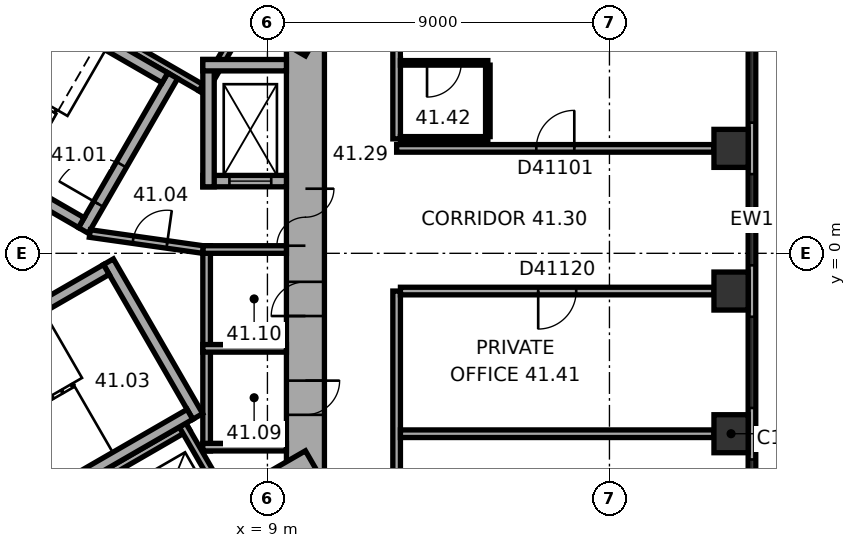
"""IFC4 building model, lengths in metres.
Left out: names, types, materials, properties, quantities, classifications, styles, units other than length and angle.
Written with IfcOpenShell. Run it as: python <this file> out.ifc"""

import sys

from ifc_helpers import new_model, si_unit, direction, frame, frame_2d, origin, origin_2d, place, context, subcontext, project, spatial, rectangle, extrude, element, fill, save


model = new_model("IFC4")
c1 = context("Model", 3, precision=1e-05, world=origin(), true_north=direction((0.0, 1.0)))
c2 = subcontext(c1, "Body", "Model", "MODEL_VIEW")
j1 = project(units=[si_unit("LENGTHUNIT", "METRE"), si_unit("PLANEANGLEUNIT", "RADIAN")], contexts=[c1])
p1 = place(None, origin())
s1 = spatial("IfcSite", under=j1, at=p1, CompositionType="ELEMENT")
p2 = place(p1, origin())
s2 = spatial("IfcBuilding", under=s1, at=p2, CompositionType="ELEMENT")
p3 = place(p2, frame((0.0, 0.0, 168.8)))
s3 = spatial("IfcBuildingStorey", under=s2, at=p3, CompositionType="ELEMENT", Elevation=168.8)
for number, where, z_axis, x_axis in (
    (1, (21.2, -4.747, 0.0), (0.0, 0.0, 1.0), (0.0, 1.0, 0.0)),
    (2, (21.2, -0.993, 0.0), (0.0, 0.0, 1.0), (0.0, 1.0, 0.0)),
    (3, (21.2, 2.761, 0.0), (0.0, 0.0, 1.0), (0.0, 1.0, 0.0)),
):
    element("IfcColumn", number, at=place(p3, frame(where, z_axis=z_axis, x_axis=x_axis)), inside=s3, PredefinedType="COLUMN", context=c2, shape_type="SweptSolid", body=[
        extrude(rectangle(XDim=1.0, YDim=0.9, at=origin_2d()), origin(), (0.0, 0.0, 1.0), 3.7),
    ])
p4 = place(p3, frame((10.0, -6.062, 0.0), z_axis=(0.0, 0.0, 1.0), x_axis=(0.0, 1.0, 0.0)))
e4 = element("IfcWall", 4, at=p4, inside=s3, PredefinedType="SHEAR", context=c2, shape_type="SweptSolid", body=[
    extrude(rectangle(XDim=12.125, YDim=1.0, at=frame_2d((6.062, 0.0))), origin(), (0.0, 0.0, 1.0), 3.7),
])
p5 = place(p4, frame((6.262, 0.0, 0.0)))
e5 = element("IfcOpeningElement", 5, at=p5, cuts=e4, PredefinedType="OPENING", context=c2, shape_type="SweptSolid", body=[
    extrude(rectangle(XDim=1.5, YDim=2.1, at=frame_2d((0.75, 1.05))), frame((0.0, 0.51, 0.0), z_axis=(0.0, -1.0, 0.0), x_axis=(1.0, 0.0, 0.0)), (0.0, 0.0, 1.0), 1.02),
])
p6 = place(p4, frame((1.812, 0.0, 0.0)))
e6 = element("IfcOpeningElement", 6, at=p6, cuts=e4, PredefinedType="OPENING", context=c2, shape_type="SweptSolid", body=[
    extrude(rectangle(XDim=0.9, YDim=2.1, at=frame_2d((0.45, 1.05))), frame((0.0, 0.51, 0.0), z_axis=(0.0, -1.0, 0.0), x_axis=(1.0, 0.0, 0.0)), (0.0, 0.0, 1.0), 1.02),
])
p7 = place(p4, frame((4.412, 0.0, 0.0)))
e7 = element("IfcOpeningElement", 7, at=p7, cuts=e4, PredefinedType="OPENING", context=c2, shape_type="SweptSolid", body=[
    extrude(rectangle(XDim=0.9, YDim=2.1, at=frame_2d((0.45, 1.05))), frame((0.0, 0.51, 0.0), z_axis=(0.0, -1.0, 0.0), x_axis=(1.0, 0.0, 0.0)), (0.0, 0.0, 1.0), 1.02),
])
p8 = place(p3, frame((10.25, 5.629, 0.0), z_axis=(0.0, 0.0, 1.0), x_axis=(-0.866022616891, 0.50000482701, 0.0)))
e8 = element("IfcWall", 8, at=p8, inside=s3, PredefinedType="SHEAR", context=c2, shape_type="SweptSolid", body=[
    extrude(rectangle(XDim=12.125, YDim=1.0, at=frame_2d((6.062, 0.0))), origin(), (0.0, 0.0, 1.0), 3.7),
])
p9 = place(p8, frame((4.012, 0.0, 0.0)))
e9 = element("IfcOpeningElement", 9, at=p9, cuts=e8, PredefinedType="OPENING", context=c2, shape_type="SweptSolid", body=[
    extrude(rectangle(XDim=0.9, YDim=2.1, at=frame_2d((0.45, 1.05))), frame((0.0, 0.51, 0.0), z_axis=(0.0, -1.0, 0.0), x_axis=(1.0, 0.0, 0.0)), (0.0, 0.0, 1.0), 1.02),
])
p10 = place(p8, frame((7.912, 0.0, 0.0)))
e10 = element("IfcOpeningElement", 10, at=p10, cuts=e8, PredefinedType="OPENING", context=c2, shape_type="SweptSolid", body=[
    extrude(rectangle(XDim=0.9, YDim=2.1, at=frame_2d((0.45, 1.05))), frame((0.0, 0.51, 0.0), z_axis=(0.0, -1.0, 0.0), x_axis=(1.0, 0.0, 0.0)), (0.0, 0.0, 1.0), 1.02),
])
p11 = place(p3, frame((-0.25, -11.691, 0.0), z_axis=(0.0, 0.0, 1.0), x_axis=(0.866022616891, 0.50000482701, 0.0)))
e11 = element("IfcWall", 11, at=p11, inside=s3, PredefinedType="SHEAR", context=c2, shape_type="SweptSolid", body=[
    extrude(rectangle(XDim=12.125, YDim=1.0, at=frame_2d((6.062, 0.0))), origin(), (0.0, 0.0, 1.0), 3.7),
])
p12 = place(p11, frame((2.612, 0.0, 0.0)))
e12 = element("IfcOpeningElement", 12, at=p12, cuts=e11, PredefinedType="OPENING", context=c2, shape_type="SweptSolid", body=[
    extrude(rectangle(XDim=1.1, YDim=2.1, at=frame_2d((0.55, 1.05))), frame((0.0, 0.51, 0.0), z_axis=(0.0, -1.0, 0.0), x_axis=(1.0, 0.0, 0.0)), (0.0, 0.0, 1.0), 1.02),
])
p13 = place(p11, frame((5.212, 0.0, 0.0)))
e13 = element("IfcOpeningElement", 13, at=p13, cuts=e11, PredefinedType="OPENING", context=c2, shape_type="SweptSolid", body=[
    extrude(rectangle(XDim=1.1, YDim=2.1, at=frame_2d((0.55, 1.05))), frame((0.0, 0.51, 0.0), z_axis=(0.0, -1.0, 0.0), x_axis=(1.0, 0.0, 0.0)), (0.0, 0.0, 1.0), 1.02),
])
p14 = place(p11, frame((7.812, 0.0, 0.0)))
e14 = element("IfcOpeningElement", 14, at=p14, cuts=e11, PredefinedType="OPENING", context=c2, shape_type="SweptSolid", body=[
    extrude(rectangle(XDim=1.1, YDim=2.1, at=frame_2d((0.55, 1.05))), frame((0.0, 0.51, 0.0), z_axis=(0.0, -1.0, 0.0), x_axis=(1.0, 0.0, 0.0)), (0.0, 0.0, 1.0), 1.02),
])
p15 = place(p3, frame((21.75, -9.138, 0.0), z_axis=(0.0, 0.0, 1.0), x_axis=(0.0, 1.0, 0.0)))
e15 = element("IfcWall", 15, at=p15, inside=s3, PredefinedType="STANDARD", context=c2, shape_type="SweptSolid", body=[
    extrude(rectangle(XDim=20.044, YDim=0.2, at=frame_2d((10.022, 0.0))), origin(), (0.0, 0.0, 1.0), 3.7),
])
p16 = place(p15, frame((1.314, 0.0, 0.9)))
e16 = element("IfcOpeningElement", 16, at=p16, cuts=e15, PredefinedType="OPENING", context=c2, shape_type="SweptSolid", body=[
    extrude(rectangle(XDim=2.4, YDim=2.0, at=frame_2d((1.2, 1.0))), frame((0.0, 0.11, 0.0), z_axis=(0.0, -1.0, 0.0), x_axis=(1.0, 0.0, 0.0)), (0.0, 0.0, 1.0), 0.22),
])
p17 = place(p15, frame((5.069, 0.0, 0.9)))
e17 = element("IfcOpeningElement", 17, at=p17, cuts=e15, PredefinedType="OPENING", context=c2, shape_type="SweptSolid", body=[
    extrude(rectangle(XDim=2.4, YDim=2.0, at=frame_2d((1.2, 1.0))), frame((0.0, 0.11, 0.0), z_axis=(0.0, -1.0, 0.0), x_axis=(1.0, 0.0, 0.0)), (0.0, 0.0, 1.0), 0.22),
])
p18 = place(p15, frame((8.823, 0.0, 0.9)))
e18 = element("IfcOpeningElement", 18, at=p18, cuts=e15, PredefinedType="OPENING", context=c2, shape_type="SweptSolid", body=[
    extrude(rectangle(XDim=2.4, YDim=2.0, at=frame_2d((1.2, 1.0))), frame((0.0, 0.11, 0.0), z_axis=(0.0, -1.0, 0.0), x_axis=(1.0, 0.0, 0.0)), (0.0, 0.0, 1.0), 0.22),
])
p19 = place(p15, frame((12.577, 0.0, 0.9)))
e19 = element("IfcOpeningElement", 19, at=p19, cuts=e15, PredefinedType="OPENING", context=c2, shape_type="SweptSolid", body=[
    extrude(rectangle(XDim=2.4, YDim=2.0, at=frame_2d((1.2, 1.0))), frame((0.0, 0.11, 0.0), z_axis=(0.0, -1.0, 0.0), x_axis=(1.0, 0.0, 0.0)), (0.0, 0.0, 1.0), 0.22),
])
p20 = place(p15, frame((16.331, 0.0, 0.9)))
e20 = element("IfcOpeningElement", 20, at=p20, cuts=e15, PredefinedType="OPENING", context=c2, shape_type="SweptSolid", body=[
    extrude(rectangle(XDim=2.4, YDim=2.0, at=frame_2d((1.2, 1.0))), frame((0.0, 0.11, 0.0), z_axis=(0.0, -1.0, 0.0), x_axis=(1.0, 0.0, 0.0)), (0.0, 0.0, 1.0), 0.22),
])
p21 = place(p3, frame((7.4, -5.2, 0.0), z_axis=(0.0, 0.0, 1.0), x_axis=(0.0, 1.0, 0.0)))
e21 = element("IfcWall", 21, at=p21, inside=s3, PredefinedType="PARTITIONING", context=c2, shape_type="SweptSolid", body=[
    extrude(rectangle(XDim=5.4, YDim=0.2, at=frame_2d((2.7, 0.0))), origin(), (0.0, 0.0, 1.0), 3.42),
])
for number, where, z_axis, x_axis in (
    (22, (7.3, -5.1, 0.0), (0.0, 0.0, 1.0), (1.0, 0.0, 0.0)),
    (23, (7.3, -2.5, 0.0), (0.0, 0.0, 1.0), (1.0, 0.0, 0.0)),
    (24, (7.3, 0.1, 0.0), (0.0, 0.0, 1.0), (1.0, 0.0, 0.0)),
):
    element("IfcWall", number, at=place(p3, frame(where, z_axis=z_axis, x_axis=x_axis)), inside=s3, PredefinedType="PARTITIONING", context=c2, shape_type="SweptSolid", body=[
        extrude(rectangle(XDim=2.2, YDim=0.2, at=frame_2d((1.1, 0.0))), origin(), (0.0, 0.0, 1.0), 3.42),
    ])
p22 = place(p3, frame((7.424, 4.259, 0.0), z_axis=(0.0, 0.0, 1.0), x_axis=(-0.866026010844, 0.49999894854, 0.0)))
e25 = element("IfcWall", 25, at=p22, inside=s3, PredefinedType="PARTITIONING", context=c2, shape_type="SweptSolid", body=[
    extrude(rectangle(XDim=8.0, YDim=0.2, at=frame_2d((4.0, 0.0))), origin(), (0.0, 0.0, 1.0), 3.42),
])
p23 = place(p3, frame((7.287, 4.222, 0.0), z_axis=(0.0, 0.0, 1.0), x_axis=(0.499946605688, 0.86605622881, 0.0)))
e26 = element("IfcWall", 26, at=p23, inside=s3, PredefinedType="PARTITIONING", context=c2, shape_type="SweptSolid", body=[
    extrude(rectangle(XDim=2.2, YDim=0.2, at=frame_2d((1.1, 0.0))), origin(), (0.0, 0.0, 1.0), 3.42),
])
p24 = place(p3, frame((-0.024, -8.559, 0.0), z_axis=(0.0, 0.0, 1.0), x_axis=(0.866026010844, 0.49999894854, 0.0)))
e27 = element("IfcWall", 27, at=p24, inside=s3, PredefinedType="PARTITIONING", context=c2, shape_type="SweptSolid", body=[
    extrude(rectangle(XDim=8.0, YDim=0.2, at=frame_2d((4.0, 0.0))), origin(), (0.0, 0.0, 1.0), 3.42),
])
p25 = place(p3, frame((6.768, -4.522, 0.0), z_axis=(0.0, 0.0, 1.0), x_axis=(0.50002983664, -0.866008176907, 0.0)))
e28 = element("IfcWall", 28, at=p25, inside=s3, PredefinedType="PARTITIONING", context=c2, shape_type="SweptSolid", body=[
    extrude(rectangle(XDim=2.2, YDim=0.2, at=frame_2d((1.1, 0.0))), origin(), (0.0, 0.0, 1.0), 3.42),
])
p26 = place(p3, frame((4.158, 0.602, 0.0), z_axis=(0.0, 0.0, 1.0), x_axis=(0.499977259774, 0.866038532462, 0.0)))
e29 = element("IfcWall", 29, at=p26, inside=s3, PredefinedType="SHEAR", context=c2, shape_type="SweptSolid", body=[
    extrude(rectangle(XDim=4.7, YDim=0.3, at=frame_2d((2.35, 0.0))), origin(), (0.0, 0.0, 1.0), 3.42),
])
p27 = place(p26, frame((0.8, 0.0, 0.0)))
e30 = element("IfcOpeningElement", 30, at=p27, cuts=e29, PredefinedType="OPENING", context=c2, shape_type="SweptSolid", body=[
    extrude(rectangle(XDim=1.2, YDim=2.1, at=frame_2d((0.6, 1.05))), frame((0.0, 0.16, 0.0), z_axis=(0.0, -1.0, 0.0), x_axis=(1.0, 0.0, 0.0)), (0.0, 0.0, 1.0), 0.32),
])
for number, where, z_axis, x_axis in (
    (31, (4.103, 0.807, 0.0), (0.0, 0.0, 1.0), (-0.866, 0.5, 0.0)),
    (32, (6.303, 4.617, 0.0), (0.0, 0.0, 1.0), (-0.866, 0.5, 0.0)),
):
    element("IfcWall", number, at=place(p3, frame(where, z_axis=z_axis, x_axis=x_axis)), inside=s3, PredefinedType="SHEAR", context=c2, shape_type="SweptSolid", body=[
        extrude(rectangle(XDim=7.06, YDim=0.3, at=frame_2d((3.53, 0.0))), origin(), (0.0, 0.0, 1.0), 3.42),
    ])
p28 = place(p3, frame((4.816, -0.222, 0.0), z_axis=(0.0, 0.0, 1.0), x_axis=(0.499977259774, -0.866038532462, 0.0)))
e33 = element("IfcWall", 33, at=p28, inside=s3, PredefinedType="SHEAR", context=c2, shape_type="SweptSolid", body=[
    extrude(rectangle(XDim=4.7, YDim=0.3, at=frame_2d((2.35, 0.0))), origin(), (0.0, 0.0, 1.0), 3.42),
])
for number, where, z_axis, x_axis in (
    (34, (-1.353, -3.957, 0.0), (0.0, 0.0, 1.0), (0.866, 0.5, 0.0)),
    (35, (0.847, -7.767, 0.0), (0.0, 0.0, 1.0), (0.866, 0.5, 0.0)),
):
    element("IfcWall", number, at=place(p3, frame(where, z_axis=z_axis, x_axis=x_axis)), inside=s3, PredefinedType="SHEAR", context=c2, shape_type="SweptSolid", body=[
        extrude(rectangle(XDim=7.06, YDim=0.3, at=frame_2d((3.53, 0.0))), origin(), (0.0, 0.0, 1.0), 3.42),
    ])
p29 = place(p3, frame((7.3, 1.9, 0.0), z_axis=(0.0, 0.0, 1.0), x_axis=(1.0, 0.0, 0.0)))
e36 = element("IfcWall", 36, at=p29, inside=s3, PredefinedType="SHEAR", context=c2, shape_type="SweptSolid", body=[
    extrude(rectangle(XDim=2.2, YDim=0.3, at=frame_2d((1.1, 0.0))), origin(), (0.0, 0.0, 1.0), 3.42),
])
p30 = place(p29, frame((0.7, 0.0, 0.0)))
e37 = element("IfcOpeningElement", 37, at=p30, cuts=e36, PredefinedType="OPENING", context=c2, shape_type="SweptSolid", body=[
    extrude(rectangle(XDim=1.1, YDim=2.1, at=frame_2d((0.55, 1.05))), frame((0.0, 0.16, 0.0), z_axis=(0.0, -1.0, 0.0), x_axis=(1.0, 0.0, 0.0)), (0.0, 0.0, 1.0), 0.32),
])
p31 = place(p3, frame((7.45, 1.75, 0.0), z_axis=(0.0, 0.0, 1.0), x_axis=(0.0, 1.0, 0.0)))
e38 = element("IfcWall", 38, at=p31, inside=s3, PredefinedType="SHEAR", context=c2, shape_type="SweptSolid", body=[
    extrude(rectangle(XDim=3.35, YDim=0.3, at=frame_2d((1.675, 0.0))), origin(), (0.0, 0.0, 1.0), 3.42),
])
p32 = place(p3, frame((7.3, 4.95, 0.0), z_axis=(0.0, 0.0, 1.0), x_axis=(1.0, 0.0, 0.0)))
e39 = element("IfcWall", 39, at=p32, inside=s3, PredefinedType="SHEAR", context=c2, shape_type="SweptSolid", body=[
    extrude(rectangle(XDim=2.2, YDim=0.3, at=frame_2d((1.1, 0.0))), origin(), (0.0, 0.0, 1.0), 3.42),
])
p33 = place(p3, frame((4.327, 0.521, 0.0), z_axis=(0.0, 0.0, 1.0), x_axis=(0.990124376366, -0.14019172346, 0.0)))
e40 = element("IfcWall", 40, at=p33, inside=s3, PredefinedType="PARTITIONING", context=c2, shape_type="SweptSolid", body=[
    extrude(rectangle(XDim=3.002, YDim=0.2, at=frame_2d((1.501, 0.0))), origin(), (0.0, 0.0, 1.0), 3.42),
])
p34 = place(p33, frame((1.15, 0.0, 0.0)))
e41 = element("IfcOpeningElement", 41, at=p34, cuts=e40, PredefinedType="OPENING", context=c2, shape_type="SweptSolid", body=[
    extrude(rectangle(XDim=0.9, YDim=2.1, at=frame_2d((0.45, 1.05))), frame((0.0, 0.11, 0.0), z_axis=(0.0, -1.0, 0.0), x_axis=(1.0, 0.0, 0.0)), (0.0, 0.0, 1.0), 0.22),
])
p35 = place(p3, frame((12.4, -6.022, 0.0), z_axis=(0.0, 0.0, 1.0), x_axis=(0.0, 1.0, 0.0)))
e42 = element("IfcWall", 42, at=p35, inside=s3, PredefinedType="PARTITIONING", context=c2, shape_type="SweptSolid", body=[
    extrude(rectangle(XDim=5.029, YDim=0.2, at=frame_2d((2.515, 0.0))), origin(), (0.0, 0.0, 1.0), 3.42),
])
p36 = place(p3, frame((12.4, 3.011, 0.0), z_axis=(0.0, 0.0, 1.0), x_axis=(0.0, 1.0, 0.0)))
e43 = element("IfcWall", 43, at=p36, inside=s3, PredefinedType="PARTITIONING", context=c2, shape_type="SweptSolid", body=[
    extrude(rectangle(XDim=3.051, YDim=0.2, at=frame_2d((1.525, 0.0))), origin(), (0.0, 0.0, 1.0), 3.42),
])
p37 = place(p3, frame((12.5, -0.993, 0.0), z_axis=(0.0, 0.0, 1.0), x_axis=(1.0, 0.0, 0.0)))
e44 = element("IfcWall", 44, at=p37, inside=s3, PredefinedType="PARTITIONING", context=c2, shape_type="SweptSolid", body=[
    extrude(rectangle(XDim=8.25, YDim=0.2, at=frame_2d((4.125, 0.0))), origin(), (0.0, 0.0, 1.0), 2.87),
])
p38 = place(p37, frame((3.625, 0.0, 0.0)))
e45 = element("IfcOpeningElement", 45, at=p38, cuts=e44, PredefinedType="OPENING", context=c2, shape_type="SweptSolid", body=[
    extrude(rectangle(XDim=1.0, YDim=2.1, at=frame_2d((0.5, 1.05))), frame((0.0, 0.11, 0.0), z_axis=(0.0, -1.0, 0.0), x_axis=(1.0, 0.0, 0.0)), (0.0, 0.0, 1.0), 0.22),
])
p39 = place(p3, frame((12.5, 5.011, 0.0), z_axis=(0.0, 0.0, 1.0), x_axis=(1.0, 0.0, 0.0)))
e46 = element("IfcWall", 46, at=p39, inside=s3, PredefinedType="PARTITIONING", context=c2, shape_type="SweptSolid", body=[
    extrude(rectangle(XDim=2.3, YDim=0.12, at=frame_2d((1.15, 0.0))), origin(), (0.0, 0.0, 1.0), 3.42),
])
p40 = place(p39, frame((0.7, 0.0, 0.0)))
e47 = element("IfcOpeningElement", 47, at=p40, cuts=e46, PredefinedType="OPENING", context=c2, shape_type="SweptSolid", body=[
    extrude(rectangle(XDim=0.9, YDim=2.1, at=frame_2d((0.45, 1.05))), frame((0.0, 0.07, 0.0), z_axis=(0.0, -1.0, 0.0), x_axis=(1.0, 0.0, 0.0)), (0.0, 0.0, 1.0), 0.14),
])
p41 = place(p3, frame((14.8, 3.011, 0.0), z_axis=(0.0, 0.0, 1.0), x_axis=(-1.0, 0.0, 0.0)))
e48 = element("IfcWall", 48, at=p41, inside=s3, PredefinedType="PARTITIONING", context=c2, shape_type="SweptSolid", body=[
    extrude(rectangle(XDim=2.3, YDim=0.12, at=frame_2d((1.15, 0.0))), origin(), (0.0, 0.0, 1.0), 3.42),
])
p42 = place(p3, frame((14.8, 4.951, 0.0), z_axis=(0.0, 0.0, 1.0), x_axis=(0.0, -1.0, 0.0)))
e49 = element("IfcWall", 49, at=p42, inside=s3, PredefinedType="PARTITIONING", context=c2, shape_type="SweptSolid", body=[
    extrude(rectangle(XDim=1.88, YDim=0.12, at=frame_2d((0.94, 0.0))), origin(), (0.0, 0.0, 1.0), 3.42),
])
p43 = place(p3, frame((20.75, -4.747, 0.0), z_axis=(0.0, 0.0, 1.0), x_axis=(-1.0, 0.0, 0.0)))
e50 = element("IfcWall", 50, at=p43, inside=s3, PredefinedType="PARTITIONING", context=c2, shape_type="SweptSolid", body=[
    extrude(rectangle(XDim=8.25, YDim=0.2, at=frame_2d((4.125, 0.0))), origin(), (0.0, 0.0, 1.0), 3.42),
])
p44 = place(p3, frame((20.75, 2.761, 0.0), z_axis=(0.0, 0.0, 1.0), x_axis=(-1.0, 0.0, 0.0)))
e51 = element("IfcWall", 51, at=p44, inside=s3, PredefinedType="PARTITIONING", context=c2, shape_type="SweptSolid", body=[
    extrude(rectangle(XDim=8.35, YDim=0.2, at=frame_2d((4.175, 0.0))), origin(), (0.0, 0.0, 1.0), 3.42),
])
p45 = place(p44, frame((3.675, 0.0, 0.0)))
e52 = element("IfcOpeningElement", 52, at=p45, cuts=e51, PredefinedType="OPENING", context=c2, shape_type="SweptSolid", body=[
    extrude(rectangle(XDim=1.0, YDim=2.1, at=frame_2d((0.5, 1.05))), frame((0.0, 0.11, 0.0), z_axis=(0.0, -1.0, 0.0), x_axis=(1.0, 0.0, 0.0)), (0.0, 0.0, 1.0), 0.22),
])
p46 = place(p16, origin())
e53 = element("IfcWindow", 53, at=p46, inside=s3, PartitioningType="SINGLE_PANEL", PredefinedType="WINDOW", context=c2, shape_type="SweptSolid", body=[
    extrude(rectangle(XDim=2.4, YDim=2.0, at=frame_2d((1.2, 1.0))), frame((0.0, 0.03, 0.0), z_axis=(0.0, -1.0, 0.0), x_axis=(1.0, 0.0, 0.0)), (0.0, 0.0, 1.0), 0.06),
])
fill(e16, e53)
p47 = place(p17, origin())
e54 = element("IfcWindow", 54, at=p47, inside=s3, PartitioningType="SINGLE_PANEL", PredefinedType="WINDOW", context=c2, shape_type="SweptSolid", body=[
    extrude(rectangle(XDim=2.4, YDim=2.0, at=frame_2d((1.2, 1.0))), frame((0.0, 0.03, 0.0), z_axis=(0.0, -1.0, 0.0), x_axis=(1.0, 0.0, 0.0)), (0.0, 0.0, 1.0), 0.06),
])
fill(e17, e54)
p48 = place(p18, origin())
e55 = element("IfcWindow", 55, at=p48, inside=s3, PartitioningType="SINGLE_PANEL", PredefinedType="WINDOW", context=c2, shape_type="SweptSolid", body=[
    extrude(rectangle(XDim=2.4, YDim=2.0, at=frame_2d((1.2, 1.0))), frame((0.0, 0.03, 0.0), z_axis=(0.0, -1.0, 0.0), x_axis=(1.0, 0.0, 0.0)), (0.0, 0.0, 1.0), 0.06),
])
fill(e18, e55)
p49 = place(p19, origin())
e56 = element("IfcWindow", 56, at=p49, inside=s3, PartitioningType="SINGLE_PANEL", PredefinedType="WINDOW", context=c2, shape_type="SweptSolid", body=[
    extrude(rectangle(XDim=2.4, YDim=2.0, at=frame_2d((1.2, 1.0))), frame((0.0, 0.03, 0.0), z_axis=(0.0, -1.0, 0.0), x_axis=(1.0, 0.0, 0.0)), (0.0, 0.0, 1.0), 0.06),
])
fill(e19, e56)
p50 = place(p5, origin())
e57 = element("IfcDoor", 57, at=p50, inside=s3, OperationType="DOUBLE_DOOR_SINGLE_SWING", PredefinedType="DOOR", context=c2, shape_type="SweptSolid", body=[
    extrude(rectangle(XDim=1.5, YDim=2.1, at=frame_2d((0.75, 1.05))), frame((0.0, 0.025, 0.0), z_axis=(0.0, -1.0, 0.0), x_axis=(1.0, 0.0, 0.0)), (0.0, 0.0, 1.0), 0.05),
])
fill(e5, e57)
p51 = place(p27, origin())
e58 = element("IfcDoor", 58, at=p51, inside=s3, OperationType="SINGLE_SWING_RIGHT", PredefinedType="DOOR", context=c2, shape_type="SweptSolid", body=[
    extrude(rectangle(XDim=1.2, YDim=2.1, at=frame_2d((0.6, 1.05))), frame((0.0, 0.025, 0.0), z_axis=(0.0, -1.0, 0.0), x_axis=(1.0, 0.0, 0.0)), (0.0, 0.0, 1.0), 0.05),
])
fill(e30, e58)
p52 = place(p34, origin())
e59 = element("IfcDoor", 59, at=p52, inside=s3, OperationType="SINGLE_SWING_LEFT", PredefinedType="DOOR", context=c2, shape_type="SweptSolid", body=[
    extrude(rectangle(XDim=0.9, YDim=2.1, at=frame_2d((0.45, 1.05))), frame((0.0, 0.025, 0.0), z_axis=(0.0, -1.0, 0.0), x_axis=(1.0, 0.0, 0.0)), (0.0, 0.0, 1.0), 0.05),
])
fill(e41, e59)
p53 = place(p6, origin())
e60 = element("IfcDoor", 60, at=p53, inside=s3, OperationType="SINGLE_SWING_LEFT", PredefinedType="DOOR", context=c2, shape_type="SweptSolid", body=[
    extrude(rectangle(XDim=0.9, YDim=2.1, at=frame_2d((0.45, 1.05))), frame((0.0, 0.025, 0.0), z_axis=(0.0, -1.0, 0.0), x_axis=(1.0, 0.0, 0.0)), (0.0, 0.0, 1.0), 0.05),
])
fill(e6, e60)
p54 = place(p7, origin())
e61 = element("IfcDoor", 61, at=p54, inside=s3, OperationType="SINGLE_SWING_LEFT", PredefinedType="DOOR", context=c2, shape_type="SweptSolid", body=[
    extrude(rectangle(XDim=0.9, YDim=2.1, at=frame_2d((0.45, 1.05))), frame((0.0, 0.025, 0.0), z_axis=(0.0, -1.0, 0.0), x_axis=(1.0, 0.0, 0.0)), (0.0, 0.0, 1.0), 0.05),
])
fill(e7, e61)
p55 = place(p30, origin())
e62 = element("IfcDoor", 62, at=p55, inside=s3, OperationType="DOUBLE_DOOR_SLIDING", PredefinedType="DOOR", context=c2, shape_type="SweptSolid", body=[
    extrude(rectangle(XDim=1.1, YDim=2.1, at=frame_2d((0.55, 1.05))), frame((0.0, 0.025, 0.0), z_axis=(0.0, -1.0, 0.0), x_axis=(1.0, 0.0, 0.0)), (0.0, 0.0, 1.0), 0.05),
])
fill(e37, e62)
p56 = place(p45, origin())
e63 = element("IfcDoor", 63, at=p56, inside=s3, OperationType="SINGLE_SWING_LEFT", PredefinedType="DOOR", context=c2, shape_type="SweptSolid", body=[
    extrude(rectangle(XDim=1.0, YDim=2.1, at=frame_2d((0.5, 1.05))), frame((0.0, 0.025, 0.0), z_axis=(0.0, -1.0, 0.0), x_axis=(1.0, 0.0, 0.0)), (0.0, 0.0, 1.0), 0.05),
])
fill(e52, e63)
p57 = place(p40, origin())
e64 = element("IfcDoor", 64, at=p57, inside=s3, OperationType="SINGLE_SWING_LEFT", PredefinedType="DOOR", context=c2, shape_type="SweptSolid", body=[
    extrude(rectangle(XDim=0.9, YDim=2.1, at=frame_2d((0.45, 1.05))), frame((0.0, 0.025, 0.0), z_axis=(0.0, -1.0, 0.0), x_axis=(1.0, 0.0, 0.0)), (0.0, 0.0, 1.0), 0.05),
])
fill(e47, e64)
p58 = place(p38, origin())
e65 = element("IfcDoor", 65, at=p58, inside=s3, OperationType="SINGLE_SWING_LEFT", PredefinedType="DOOR", context=c2, shape_type="SweptSolid", body=[
    extrude(rectangle(XDim=1.0, YDim=2.1, at=frame_2d((0.5, 1.05))), frame((0.0, 0.025, 0.0), z_axis=(0.0, -1.0, 0.0), x_axis=(1.0, 0.0, 0.0)), (0.0, 0.0, 1.0), 0.05),
])
fill(e45, e65)
save(model, sys.argv[1])
